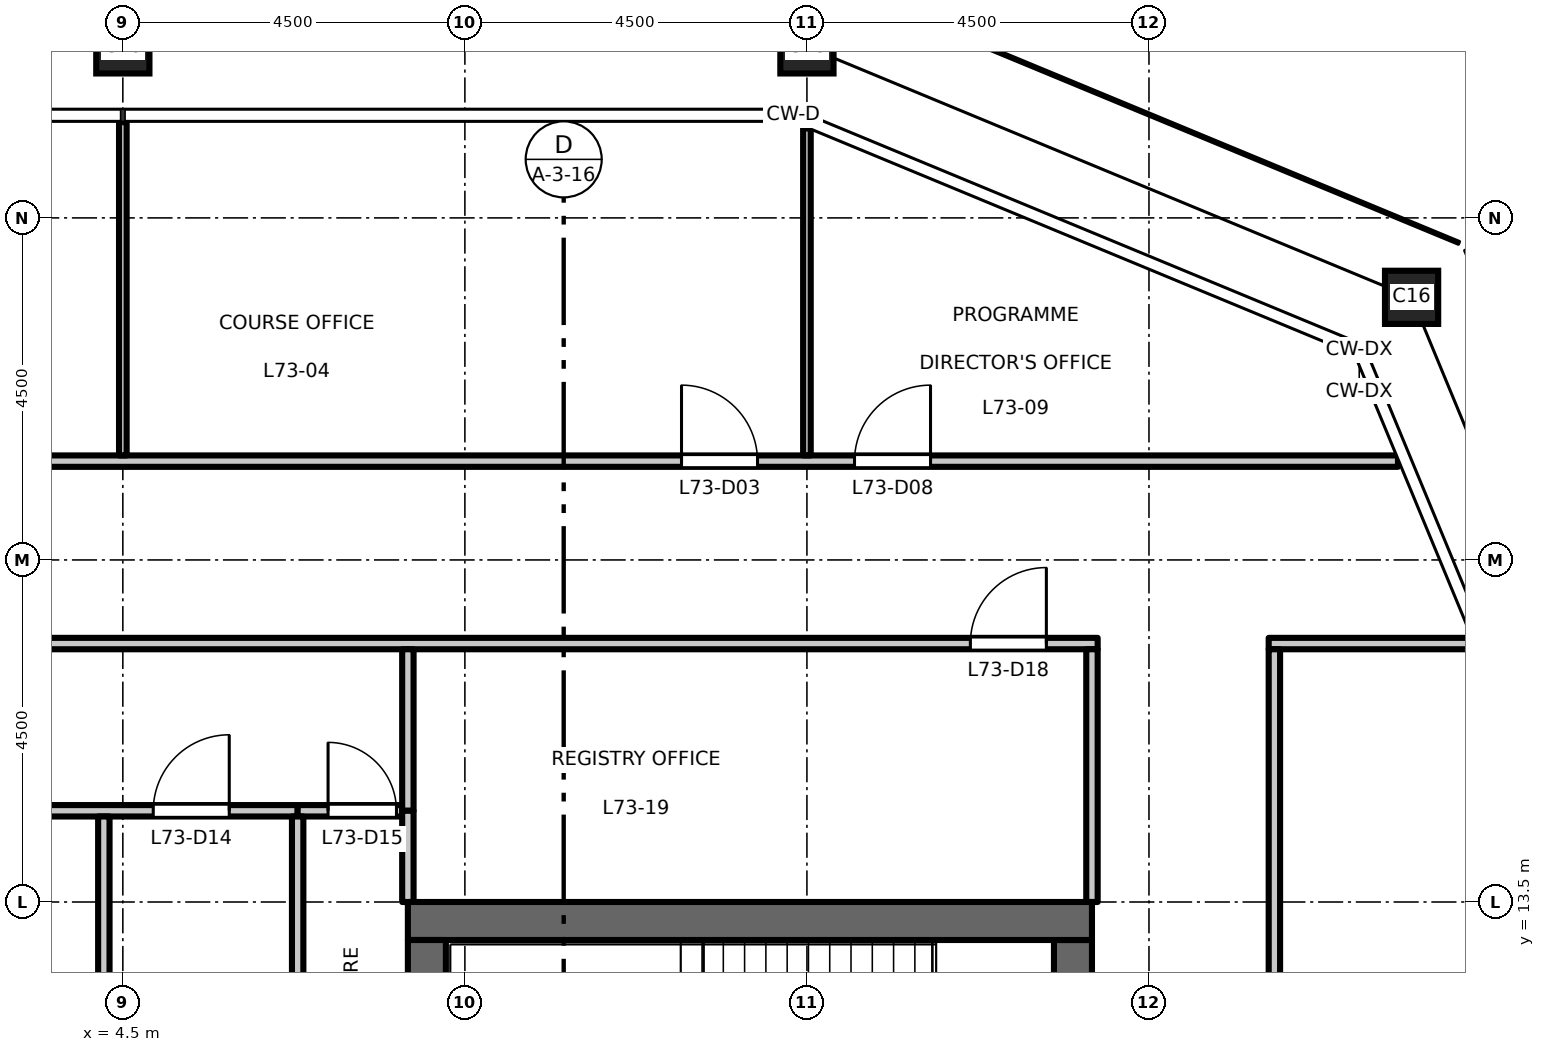
"""IFC4 building model, lengths in metres.
Left out: names, types, materials, properties, quantities, classifications, styles, units other than length and angle.
Written with IfcOpenShell. Run it as: python <this file> out.ifc"""

import sys

from ifc_helpers import new_model, si_unit, direction, frame, frame_2d, origin, origin_2d, place, context, subcontext, project, spatial, rectangle, hollow_rectangle, extrude, element, fill, save


model = new_model("IFC4")
c1 = context("Model", 3, precision=1e-05, world=origin(), true_north=direction((0.0, 1.0)))
c2 = subcontext(c1, "Body", "Model", "MODEL_VIEW")
j1 = project(units=[si_unit("LENGTHUNIT", "METRE"), si_unit("PLANEANGLEUNIT", "RADIAN")], contexts=[c1])
p1 = place(None, origin())
s1 = spatial("IfcSite", under=j1, at=p1, CompositionType="ELEMENT")
p2 = place(p1, origin())
s2 = spatial("IfcBuilding", under=s1, at=p2, CompositionType="ELEMENT")
p3 = place(p2, frame((0.0, 0.0, 339.2)))
s3 = spatial("IfcBuildingStorey", under=s2, at=p3, CompositionType="ELEMENT", Elevation=339.2)
for number, where, z_axis, x_axis in (
    (1, (21.455, 21.455, 0.0), (0.0, 0.0, 1.0), (1.0, 0.0, 0.0)),
    (2, (13.5, 24.75, 0.0), (0.0, 0.0, 1.0), (1.0, 0.0, 0.0)),
    (3, (4.5, 24.75, 0.0), (0.0, 0.0, 1.0), (1.0, 0.0, 0.0)),
):
    element("IfcColumn", number, at=place(p3, frame(where, z_axis=z_axis, x_axis=x_axis)), inside=s3, PredefinedType="COLUMN", context=c2, shape_type="SweptSolid", body=[
        extrude(hollow_rectangle(XDim=0.7, YDim=0.7, WallThickness=0.036, at=origin_2d()), origin(), (0.0, 0.0, 1.0), 4.5),
    ])
p4 = place(p3, frame((17.0, -13.0, 0.0), z_axis=(0.0, 0.0, 1.0), x_axis=(0.0, 1.0, 0.0)))
e4 = element("IfcWall", 4, at=p4, inside=s3, PredefinedType="SHEAR", context=c2, shape_type="SweptSolid", body=[
    extrude(rectangle(XDim=26.0, YDim=0.5, at=frame_2d((13.0, 0.0))), origin(), (0.0, 0.0, 1.0), 4.35),
])
p5 = place(p4, frame((16.825, 0.0, 0.0)))
e5 = element("IfcOpeningElement", 5, at=p5, cuts=e4, PredefinedType="OPENING", context=c2, shape_type="SweptSolid", body=[
    extrude(rectangle(XDim=1.8, YDim=2.1, at=frame_2d((0.9, 1.05))), frame((0.0, 0.26, 0.0), z_axis=(0.0, -1.0, 0.0), x_axis=(1.0, 0.0, 0.0)), (0.0, 0.0, 1.0), 0.52),
])
p6 = place(p4, frame((7.375, 0.0, 0.0)))
e6 = element("IfcOpeningElement", 6, at=p6, cuts=e4, PredefinedType="OPENING", context=c2, shape_type="SweptSolid", body=[
    extrude(rectangle(XDim=1.8, YDim=2.1, at=frame_2d((0.9, 1.05))), frame((0.0, 0.26, 0.0), z_axis=(0.0, -1.0, 0.0), x_axis=(1.0, 0.0, 0.0)), (0.0, 0.0, 1.0), 0.52),
])
p7 = place(p3, frame((8.25, 13.25, 0.0), z_axis=(0.0, 0.0, 1.0), x_axis=(1.0, 0.0, 0.0)))
e7 = element("IfcWall", 7, at=p7, inside=s3, PredefinedType="SHEAR", context=c2, shape_type="SweptSolid", body=[
    extrude(rectangle(XDim=9.0, YDim=0.5, at=frame_2d((4.5, 0.0))), origin(), (0.0, 0.0, 1.0), 4.35),
])
p8 = place(p3, frame((8.5, -13.0, 0.0), z_axis=(0.0, 0.0, 1.0), x_axis=(0.0, 1.0, 0.0)))
e8 = element("IfcWall", 8, at=p8, inside=s3, PredefinedType="SHEAR", context=c2, shape_type="SweptSolid", body=[
    extrude(rectangle(XDim=26.0, YDim=0.5, at=frame_2d((13.0, 0.0))), origin(), (0.0, 0.0, 1.0), 4.35),
])
p9 = place(p3, frame((-8.175, 14.7, 0.0), z_axis=(0.0, 0.0, 1.0), x_axis=(1.0, 0.0, 0.0)))
e9 = element("IfcWall", 9, at=p9, inside=s3, PredefinedType="PARTITIONING", context=c2, shape_type="SweptSolid", body=[
    extrude(rectangle(XDim=14.975, YDim=0.15, at=frame_2d((7.488, 0.0))), origin(), (0.0, 0.0, 1.0), 4.35),
])
p10 = place(p9, frame((4.575, 0.0, 0.0)))
e10 = element("IfcOpeningElement", 10, at=p10, cuts=e9, PredefinedType="OPENING", context=c2, shape_type="SweptSolid", body=[
    extrude(rectangle(XDim=1.0, YDim=2.1, at=frame_2d((0.5, 1.05))), frame((0.0, 0.085, 0.0), z_axis=(0.0, -1.0, 0.0), x_axis=(1.0, 0.0, 0.0)), (0.0, 0.0, 1.0), 0.17),
])
p11 = place(p9, frame((6.825, 0.0, 0.0)))
e11 = element("IfcOpeningElement", 11, at=p11, cuts=e9, PredefinedType="OPENING", context=c2, shape_type="SweptSolid", body=[
    extrude(rectangle(XDim=1.0, YDim=2.1, at=frame_2d((0.5, 1.05))), frame((0.0, 0.085, 0.0), z_axis=(0.0, -1.0, 0.0), x_axis=(1.0, 0.0, 0.0)), (0.0, 0.0, 1.0), 0.17),
])
p12 = place(p9, frame((13.075, 0.0, 0.0)))
e12 = element("IfcOpeningElement", 12, at=p12, cuts=e9, PredefinedType="OPENING", context=c2, shape_type="SweptSolid", body=[
    extrude(rectangle(XDim=1.0, YDim=2.1, at=frame_2d((0.5, 1.05))), frame((0.0, 0.085, 0.0), z_axis=(0.0, -1.0, 0.0), x_axis=(1.0, 0.0, 0.0)), (0.0, 0.0, 1.0), 0.17),
])
p13 = place(p3, frame((6.8, 14.7, 0.0), z_axis=(0.0, 0.0, 1.0), x_axis=(1.0, 0.0, 0.0)))
e13 = element("IfcWall", 13, at=p13, inside=s3, PredefinedType="PARTITIONING", context=c2, shape_type="SweptSolid", body=[
    extrude(rectangle(XDim=1.375, YDim=0.15, at=frame_2d((0.688, 0.0))), origin(), (0.0, 0.0, 1.0), 4.35),
])
p14 = place(p13, frame((0.4, 0.0, 0.0)))
e14 = element("IfcOpeningElement", 14, at=p14, cuts=e13, PredefinedType="OPENING", context=c2, shape_type="SweptSolid", body=[
    extrude(rectangle(XDim=0.9, YDim=2.1, at=frame_2d((0.45, 1.05))), frame((0.0, 0.085, 0.0), z_axis=(0.0, -1.0, 0.0), x_axis=(1.0, 0.0, 0.0)), (0.0, 0.0, 1.0), 0.17),
])
p15 = place(p3, frame((-17.325, 16.9, 0.0), z_axis=(0.0, 0.0, 1.0), x_axis=(1.0, 0.0, 0.0)))
e15 = element("IfcWall", 15, at=p15, inside=s3, PredefinedType="PARTITIONING", context=c2, shape_type="SweptSolid", body=[
    extrude(rectangle(XDim=34.65, YDim=0.15, at=frame_2d((17.325, 0.0))), origin(), (0.0, 0.0, 1.0), 4.35),
])
p16 = place(p15, frame((9.725, 0.0, 0.0)))
e16 = element("IfcOpeningElement", 16, at=p16, cuts=e15, PredefinedType="OPENING", context=c2, shape_type="SweptSolid", body=[
    extrude(rectangle(XDim=1.0, YDim=2.1, at=frame_2d((0.5, 1.05))), frame((0.0, 0.085, 0.0), z_axis=(0.0, -1.0, 0.0), x_axis=(1.0, 0.0, 0.0)), (0.0, 0.0, 1.0), 0.17),
])
p17 = place(p15, frame((0.725, 0.0, 0.0)))
e17 = element("IfcOpeningElement", 17, at=p17, cuts=e15, PredefinedType="OPENING", context=c2, shape_type="SweptSolid", body=[
    extrude(rectangle(XDim=1.0, YDim=2.1, at=frame_2d((0.5, 1.05))), frame((0.0, 0.085, 0.0), z_axis=(0.0, -1.0, 0.0), x_axis=(1.0, 0.0, 0.0)), (0.0, 0.0, 1.0), 0.17),
])
p18 = place(p15, frame((32.975, 0.0, 0.0)))
e18 = element("IfcOpeningElement", 18, at=p18, cuts=e15, PredefinedType="OPENING", context=c2, shape_type="SweptSolid", body=[
    extrude(rectangle(XDim=1.0, YDim=2.1, at=frame_2d((0.5, 1.05))), frame((0.0, 0.085, 0.0), z_axis=(0.0, -1.0, 0.0), x_axis=(1.0, 0.0, 0.0)), (0.0, 0.0, 1.0), 0.17),
])
p19 = place(p3, frame((19.575, 16.9, 0.0), z_axis=(0.0, 0.0, 1.0), x_axis=(1.0, 0.0, 0.0)))
e19 = element("IfcWall", 19, at=p19, inside=s3, PredefinedType="PARTITIONING", context=c2, shape_type="SweptSolid", body=[
    extrude(rectangle(XDim=2.695, YDim=0.15, at=frame_2d((1.348, 0.0))), origin(), (0.0, 0.0, 1.0), 4.35),
])
p20 = place(p3, frame((-21.276, 19.3, 0.0), z_axis=(0.0, 0.0, 1.0), x_axis=(1.0, 0.0, 0.0)))
e20 = element("IfcWall", 20, at=p20, inside=s3, PredefinedType="PARTITIONING", context=c2, shape_type="SweptSolid", body=[
    extrude(rectangle(XDim=42.552, YDim=0.15, at=frame_2d((21.276, 0.0))), origin(), (0.0, 0.0, 1.0), 4.35),
])
p21 = place(p20, frame((15.126, 0.0, 0.0)))
e21 = element("IfcOpeningElement", 21, at=p21, cuts=e20, PredefinedType="OPENING", context=c2, shape_type="SweptSolid", body=[
    extrude(rectangle(XDim=1.0, YDim=2.1, at=frame_2d((0.5, 1.05))), frame((0.0, 0.085, 0.0), z_axis=(0.0, -1.0, 0.0), x_axis=(1.0, 0.0, 0.0)), (0.0, 0.0, 1.0), 0.17),
])
p22 = place(p20, frame((17.376, 0.0, 0.0)))
e22 = element("IfcOpeningElement", 22, at=p22, cuts=e20, PredefinedType="OPENING", context=c2, shape_type="SweptSolid", body=[
    extrude(rectangle(XDim=1.0, YDim=2.1, at=frame_2d((0.5, 1.05))), frame((0.0, 0.085, 0.0), z_axis=(0.0, -1.0, 0.0), x_axis=(1.0, 0.0, 0.0)), (0.0, 0.0, 1.0), 0.17),
])
p23 = place(p20, frame((33.126, 0.0, 0.0)))
e23 = element("IfcOpeningElement", 23, at=p23, cuts=e20, PredefinedType="OPENING", context=c2, shape_type="SweptSolid", body=[
    extrude(rectangle(XDim=1.0, YDim=2.1, at=frame_2d((0.5, 1.05))), frame((0.0, 0.085, 0.0), z_axis=(0.0, -1.0, 0.0), x_axis=(1.0, 0.0, 0.0)), (0.0, 0.0, 1.0), 0.17),
])
p24 = place(p20, frame((6.126, 0.0, 0.0)))
e24 = element("IfcOpeningElement", 24, at=p24, cuts=e20, PredefinedType="OPENING", context=c2, shape_type="SweptSolid", body=[
    extrude(rectangle(XDim=1.0, YDim=2.1, at=frame_2d((0.5, 1.05))), frame((0.0, 0.085, 0.0), z_axis=(0.0, -1.0, 0.0), x_axis=(1.0, 0.0, 0.0)), (0.0, 0.0, 1.0), 0.17),
])
p25 = place(p20, frame((35.402, 0.0, 0.0)))
e25 = element("IfcOpeningElement", 25, at=p25, cuts=e20, PredefinedType="OPENING", context=c2, shape_type="SweptSolid", body=[
    extrude(rectangle(XDim=1.0, YDim=2.1, at=frame_2d((0.5, 1.05))), frame((0.0, 0.085, 0.0), z_axis=(0.0, -1.0, 0.0), x_axis=(1.0, 0.0, 0.0)), (0.0, 0.0, 1.0), 0.17),
])
p26 = place(p3, frame((4.25, 8.37, 0.0), z_axis=(0.0, 0.0, 1.0), x_axis=(0.0, 1.0, 0.0)))
e26 = element("IfcWall", 26, at=p26, inside=s3, PredefinedType="PARTITIONING", context=c2, shape_type="SweptSolid", body=[
    extrude(rectangle(XDim=6.255, YDim=0.15, at=frame_2d((3.127, 0.0))), origin(), (0.0, 0.0, 1.0), 4.35),
])
p27 = place(p3, frame((4.5, 19.375, 0.0), z_axis=(0.0, 0.0, 1.0), x_axis=(0.0, 1.0, 0.0)))
e27 = element("IfcWall", 27, at=p27, inside=s3, PredefinedType="PARTITIONING", context=c2, shape_type="SweptSolid", body=[
    extrude(rectangle(XDim=4.385, YDim=0.1, at=frame_2d((2.192, 0.0))), origin(), (0.0, 0.0, 1.0), 3.65),
])
p28 = place(p3, frame((6.8, 8.069, 0.0), z_axis=(0.0, 0.0, 1.0), x_axis=(0.0, 1.0, 0.0)))
e28 = element("IfcWall", 28, at=p28, inside=s3, PredefinedType="PARTITIONING", context=c2, shape_type="SweptSolid", body=[
    extrude(rectangle(XDim=6.556, YDim=0.15, at=frame_2d((3.278, 0.0))), origin(), (0.0, 0.0, 1.0), 4.35),
])
p29 = place(p3, frame((8.25, 14.7, 0.0), z_axis=(0.0, 0.0, 1.0), x_axis=(0.0, 1.0, 0.0)))
e29 = element("IfcWall", 29, at=p29, inside=s3, PredefinedType="PARTITIONING", context=c2, shape_type="SweptSolid", body=[
    extrude(rectangle(XDim=2.125, YDim=0.15, at=frame_2d((1.062, 0.0))), origin(), (0.0, 0.0, 1.0), 4.35),
])
p30 = place(p3, frame((8.25, 13.5, 0.0), z_axis=(0.0, 0.0, 1.0), x_axis=(0.0, 1.0, 0.0)))
e30 = element("IfcWall", 30, at=p30, inside=s3, PredefinedType="PARTITIONING", context=c2, shape_type="SweptSolid", body=[
    extrude(rectangle(XDim=1.2, YDim=0.15, at=frame_2d((0.6, 0.0))), origin(), (0.0, 0.0, 1.0), 4.35),
])
p31 = place(p3, frame((13.5, 19.375, 0.0), z_axis=(0.0, 0.0, 1.0), x_axis=(0.0, 1.0, 0.0)))
e31 = element("IfcWall", 31, at=p31, inside=s3, PredefinedType="PARTITIONING", context=c2, shape_type="SweptSolid", body=[
    extrude(rectangle(XDim=4.303, YDim=0.1, at=frame_2d((2.151, 0.0))), origin(), (0.0, 0.0, 1.0), 3.75),
])
p32 = place(p3, frame((17.25, 13.5, 0.0), z_axis=(0.0, 0.0, 1.0), x_axis=(0.0, 1.0, 0.0)))
e32 = element("IfcWall", 32, at=p32, inside=s3, PredefinedType="PARTITIONING", context=c2, shape_type="SweptSolid", body=[
    extrude(rectangle(XDim=3.325, YDim=0.15, at=frame_2d((1.663, 0.0))), origin(), (0.0, 0.0, 1.0), 4.35),
])
p33 = place(p3, frame((19.65, -16.825, 0.0), z_axis=(0.0, 0.0, 1.0), x_axis=(0.0, 1.0, 0.0)))
e33 = element("IfcWall", 33, at=p33, inside=s3, PredefinedType="PARTITIONING", context=c2, shape_type="SweptSolid", body=[
    extrude(rectangle(XDim=33.65, YDim=0.15, at=frame_2d((16.825, 0.0))), origin(), (0.0, 0.0, 1.0), 4.35),
])
p34 = place(p33, frame((0.575, 0.0, 0.0)))
e34 = element("IfcOpeningElement", 34, at=p34, cuts=e33, PredefinedType="OPENING", context=c2, shape_type="SweptSolid", body=[
    extrude(rectangle(XDim=1.0, YDim=2.1, at=frame_2d((0.5, 1.05))), frame((0.0, 0.085, 0.0), z_axis=(0.0, -1.0, 0.0), x_axis=(1.0, 0.0, 0.0)), (0.0, 0.0, 1.0), 0.17),
])
p35 = place(p23, origin())
e35 = element("IfcDoor", 35, at=p35, inside=s3, OperationType="SINGLE_SWING_LEFT", PredefinedType="DOOR", context=c2, shape_type="SweptSolid", body=[
    extrude(rectangle(XDim=1.0, YDim=2.1, at=frame_2d((0.5, 1.05))), frame((0.0, 0.025, 0.0), z_axis=(0.0, -1.0, 0.0), x_axis=(1.0, 0.0, 0.0)), (0.0, 0.0, 1.0), 0.05),
])
fill(e23, e35)
p36 = place(p25, origin())
e36 = element("IfcDoor", 36, at=p36, inside=s3, OperationType="SINGLE_SWING_RIGHT", PredefinedType="DOOR", context=c2, shape_type="SweptSolid", body=[
    extrude(rectangle(XDim=1.0, YDim=2.1, at=frame_2d((0.5, 1.05))), frame((0.0, 0.025, 0.0), z_axis=(0.0, -1.0, 0.0), x_axis=(1.0, 0.0, 0.0)), (0.0, 0.0, 1.0), 0.05),
])
fill(e25, e36)
p37 = place(p12, origin())
e37 = element("IfcDoor", 37, at=p37, inside=s3, OperationType="SINGLE_SWING_RIGHT", PredefinedType="DOOR", context=c2, shape_type="SweptSolid", body=[
    extrude(rectangle(XDim=1.0, YDim=2.1, at=frame_2d((0.5, 1.05))), frame((0.0, 0.025, 0.0), z_axis=(0.0, -1.0, 0.0), x_axis=(1.0, 0.0, 0.0)), (0.0, 0.0, 1.0), 0.05),
])
fill(e12, e37)
p38 = place(p14, origin())
e38 = element("IfcDoor", 38, at=p38, inside=s3, OperationType="SINGLE_SWING_LEFT", PredefinedType="DOOR", context=c2, shape_type="SweptSolid", body=[
    extrude(rectangle(XDim=0.9, YDim=2.1, at=frame_2d((0.45, 1.05))), frame((0.0, 0.025, 0.0), z_axis=(0.0, -1.0, 0.0), x_axis=(1.0, 0.0, 0.0)), (0.0, 0.0, 1.0), 0.05),
])
fill(e14, e38)
p39 = place(p18, origin())
e39 = element("IfcDoor", 39, at=p39, inside=s3, OperationType="SINGLE_SWING_RIGHT", PredefinedType="DOOR", context=c2, shape_type="SweptSolid", body=[
    extrude(rectangle(XDim=1.0, YDim=2.1, at=frame_2d((0.5, 1.05))), frame((0.0, 0.025, 0.0), z_axis=(0.0, -1.0, 0.0), x_axis=(1.0, 0.0, 0.0)), (0.0, 0.0, 1.0), 0.05),
])
fill(e18, e39)
save(model, sys.argv[1])
